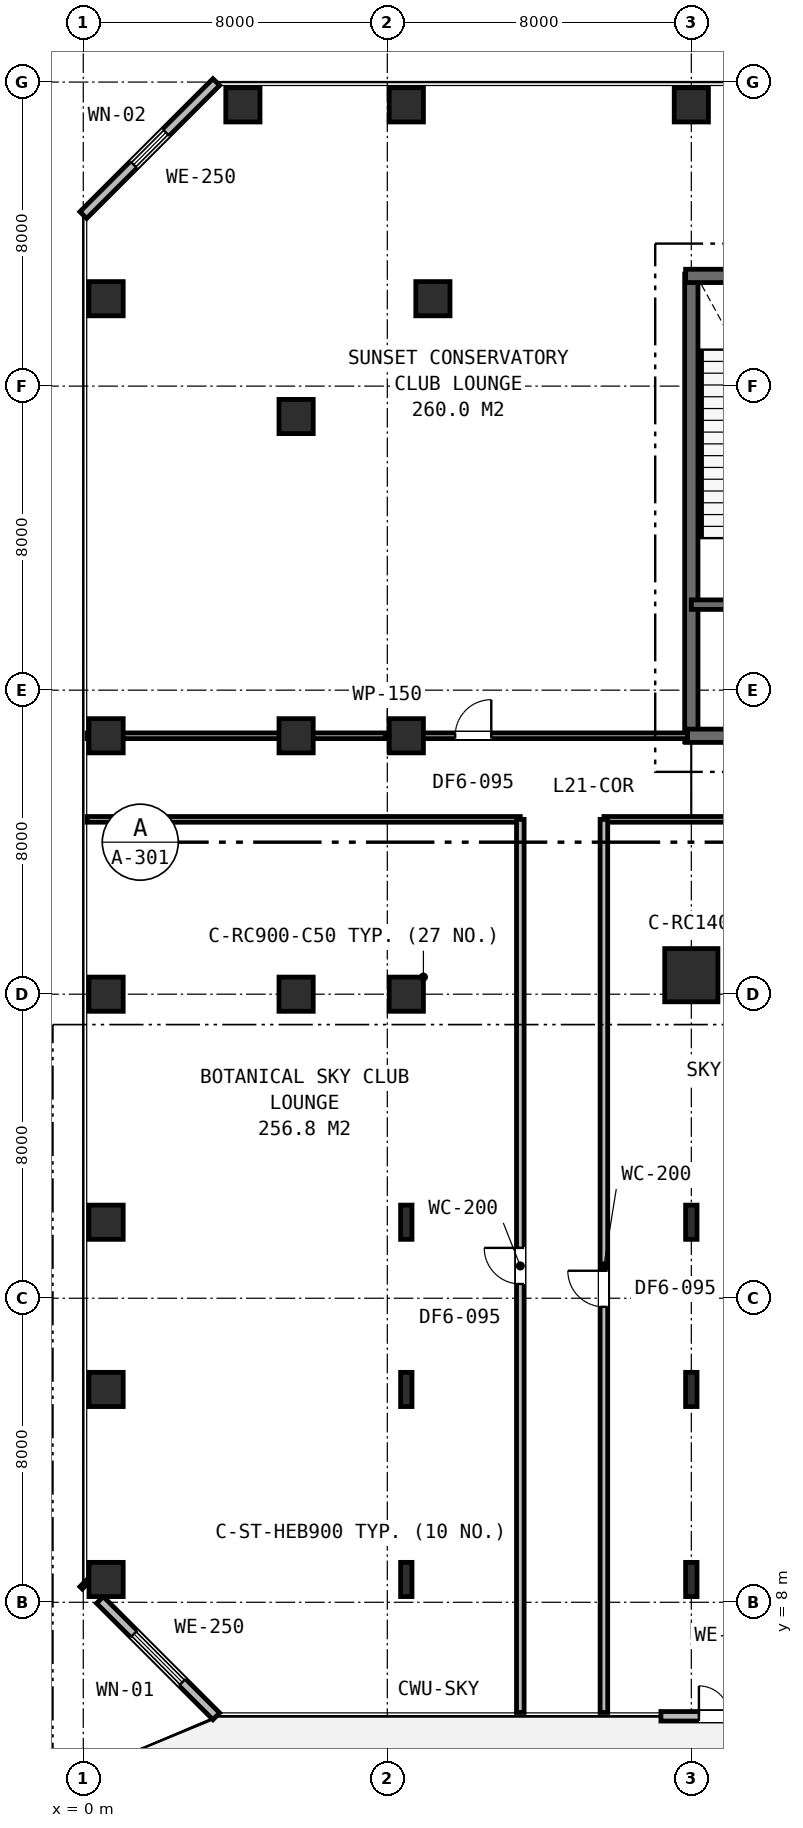
"""IFC4 building model, lengths in metres.
Left out: names, types, materials, properties, quantities, classifications, styles, units other than length and angle.
Written with IfcOpenShell. Run it as: python <this file> out.ifc"""

import sys

from ifc_helpers import new_model, si_unit, direction, frame, frame_2d, origin, origin_2d, place, context, subcontext, project, spatial, rectangle, i_section, extrude, element, fill, save


model = new_model("IFC4")
c1 = context("Model", 3, precision=1e-05, world=origin(), true_north=direction((0.0, 1.0)))
c2 = subcontext(c1, "Body", "Model", "MODEL_VIEW")
j1 = project(units=[si_unit("LENGTHUNIT", "METRE"), si_unit("PLANEANGLEUNIT", "RADIAN")], contexts=[c1])
p1 = place(None, origin())
s1 = spatial("IfcSite", under=j1, at=p1, CompositionType="ELEMENT")
p2 = place(p1, origin())
s2 = spatial("IfcBuilding", under=s1, at=p2, CompositionType="ELEMENT")
p3 = place(p2, frame((0.0, 0.0, 84.6)))
s3 = spatial("IfcBuildingStorey", under=s2, at=p3, CompositionType="ELEMENT", Elevation=84.6)
p4 = place(p3, frame((16.0, 30.65, 0.0), z_axis=(0.0, 0.0, 1.0), x_axis=(0.0, 1.0, 0.0)))
e1 = element("IfcWall", 1, at=p4, inside=s3, PredefinedType="SHEAR", context=c2, shape_type="SweptSolid", body=[
    extrude(rectangle(XDim=12.3, YDim=0.35, at=frame_2d((6.15, 0.0))), origin(), (0.0, 0.0, 1.0), 5.4),
])
p5 = place(p3, frame((15.85, 42.9, 0.0), z_axis=(0.0, 0.0, 1.0), x_axis=(1.0, 0.0, 0.0)))
e2 = element("IfcWall", 2, at=p5, inside=s3, PredefinedType="SHEAR", context=c2, shape_type="SweptSolid", body=[
    extrude(rectangle(XDim=24.3, YDim=0.35, at=frame_2d((12.15, 0.0))), origin(), (0.0, 0.0, 1.0), 5.4),
])
p6 = place(p3, frame((15.85, 30.8, 0.0), z_axis=(0.0, 0.0, 1.0), x_axis=(1.0, 0.0, 0.0)))
e3 = element("IfcWall", 3, at=p6, inside=s3, PredefinedType="SHEAR", context=c2, shape_type="SweptSolid", body=[
    extrude(rectangle(XDim=11.2, YDim=0.35, at=frame_2d((5.6, 0.0))), origin(), (0.0, 0.0, 1.0), 5.4),
])
p7 = place(p6, frame((2.45, 0.0, 0.0)))
e4 = element("IfcOpeningElement", 4, at=p7, cuts=e3, PredefinedType="OPENING", context=c2, shape_type="SweptSolid", body=[
    extrude(rectangle(XDim=1.1, YDim=2.15, at=frame_2d((0.55, 1.075))), frame((0.0, 0.185, 0.0), z_axis=(0.0, -1.0, 0.0), x_axis=(1.0, 0.0, 0.0)), (0.0, 0.0, 1.0), 0.37),
])
p8 = place(p3, frame((16.0, 34.25, 0.0), z_axis=(0.0, 0.0, 1.0), x_axis=(1.0, 0.0, 0.0)))
e5 = element("IfcWall", 5, at=p8, inside=s3, PredefinedType="SHEAR", context=c2, shape_type="SweptSolid", body=[
    extrude(rectangle(XDim=6.05, YDim=0.25, at=frame_2d((3.025, 0.0))), origin(), (0.0, 0.0, 1.0), 5.4),
])
p9 = place(p8, frame((1.25, 0.0, 0.0)))
e6 = element("IfcOpeningElement", 6, at=p9, cuts=e5, PredefinedType="OPENING", context=c2, shape_type="SweptSolid", body=[
    extrude(rectangle(XDim=1.0, YDim=2.15, at=frame_2d((0.5, 1.075))), frame((0.0, 0.135, 0.0), z_axis=(0.0, -1.0, 0.0), x_axis=(1.0, 0.0, 0.0)), (0.0, 0.0, 1.0), 0.27),
])
p10 = place(p8, frame((4.2, 0.0, 0.0)))
e7 = element("IfcOpeningElement", 7, at=p10, cuts=e5, PredefinedType="OPENING", context=c2, shape_type="SweptSolid", body=[
    extrude(rectangle(XDim=1.1, YDim=2.15, at=frame_2d((0.55, 1.075))), frame((0.0, 0.135, 0.0), z_axis=(0.0, -1.0, 0.0), x_axis=(1.0, 0.0, 0.0)), (0.0, 0.0, 1.0), 0.27),
])
p11 = place(p3, frame((8.5, 24.0, 0.0), z_axis=(0.0, 0.0, 1.0), x_axis=(1.0, 0.0, 0.0)))
e8 = element("IfcColumn", 8, at=p11, inside=s3, PredefinedType="COLUMN", context=c2, shape_type="SweptSolid", body=[
    extrude(rectangle(XDim=0.9, YDim=0.9, at=origin_2d()), origin(), (0.0, 0.0, 1.0), 5.4),
])
p12 = place(p3, frame((16.0, 24.5, 0.0), z_axis=(0.0, 0.0, 1.0), x_axis=(1.0, 0.0, 0.0)))
e9 = element("IfcColumn", 9, at=p12, inside=s3, PredefinedType="COLUMN", context=c2, shape_type="SweptSolid", body=[
    extrude(rectangle(XDim=1.4, YDim=1.4, at=origin_2d()), origin(), (0.0, 0.0, 1.0), 5.4),
])
for number, where, z_axis, x_axis in (
    (10, (5.6, 24.0, 0.0), (0.0, 0.0, 1.0), (1.0, 0.0, 0.0)),
    (11, (5.6, 30.8, 0.0), (0.0, 0.0, 1.0), (1.0, 0.0, 0.0)),
    (12, (5.6, 39.2, 0.0), (0.0, 0.0, 1.0), (1.0, 0.0, 0.0)),
    (13, (8.5, 30.8, 0.0), (0.0, 0.0, 1.0), (1.0, 0.0, 0.0)),
    (14, (9.2, 42.3, 0.0), (0.0, 0.0, 1.0), (1.0, 0.0, 0.0)),
    (15, (0.6, 24.0, 0.0), (0.0, 0.0, 1.0), (1.0, 0.0, 0.0)),
    (16, (0.6, 30.8, 0.0), (0.0, 0.0, 1.0), (1.0, 0.0, 0.0)),
    (17, (0.6, 42.3, 0.0), (0.0, 0.0, 1.0), (1.0, 0.0, 0.0)),
    (18, (4.2, 47.4, 0.0), (0.0, 0.0, 1.0), (1.0, 0.0, 0.0)),
    (19, (8.5, 47.4, 0.0), (0.0, 0.0, 1.0), (1.0, 0.0, 0.0)),
    (20, (16.0, 47.4, 0.0), (0.0, 0.0, 1.0), (1.0, 0.0, 0.0)),
    (21, (0.6, 8.6, 0.0), (0.0, 0.0, 1.0), (1.0, 0.0, 0.0)),
    (22, (0.6, 13.6, 0.0), (0.0, 0.0, 1.0), (1.0, 0.0, 0.0)),
    (23, (0.6, 18.0, 0.0), (0.0, 0.0, 1.0), (1.0, 0.0, 0.0)),
):
    element("IfcColumn", number, at=place(p3, frame(where, z_axis=z_axis, x_axis=x_axis)), inside=s3, PredefinedType="COLUMN", context=c2, shape_type="SweptSolid", body=[
        extrude(rectangle(XDim=0.9, YDim=0.9, at=origin_2d()), origin(), (0.0, 0.0, 1.0), 5.4),
    ])
for number, where, z_axis, x_axis in (
    (24, (8.5, 8.6, 0.0), (0.0, 0.0, 1.0), (1.0, 0.0, 0.0)),
    (25, (16.0, 8.6, 0.0), (0.0, 0.0, 1.0), (1.0, 0.0, 0.0)),
    (26, (8.5, 13.6, 0.0), (0.0, 0.0, 1.0), (1.0, 0.0, 0.0)),
    (27, (16.0, 13.6, 0.0), (0.0, 0.0, 1.0), (1.0, 0.0, 0.0)),
    (28, (8.5, 18.0, 0.0), (0.0, 0.0, 1.0), (1.0, 0.0, 0.0)),
    (29, (16.0, 18.0, 0.0), (0.0, 0.0, 1.0), (1.0, 0.0, 0.0)),
):
    element("IfcColumn", number, at=place(p3, frame(where, z_axis=z_axis, x_axis=x_axis)), inside=s3, PredefinedType="COLUMN", context=c2, shape_type="SweptSolid", body=[
        extrude(i_section(OverallWidth=0.3, OverallDepth=0.9, WebThickness=0.018, FlangeThickness=0.035, FilletRadius=0.03, at=origin_2d()), origin(), (0.0, 0.0, 1.0), 5.4),
    ])
p13 = place(p3, frame((15.2, 5.0, 0.0), z_axis=(0.0, 0.0, 1.0), x_axis=(1.0, 0.0, 0.0)))
e30 = element("IfcWall", 30, at=p13, inside=s3, PredefinedType="STANDARD", context=c2, shape_type="SweptSolid", body=[
    extrude(rectangle(XDim=3.6, YDim=0.25, at=frame_2d((1.8, 0.0))), origin(), (0.0, 0.0, 1.0), 5.13),
])
p14 = place(p13, frame((1.0, 0.0, 0.0)))
e31 = element("IfcOpeningElement", 31, at=p14, cuts=e30, PredefinedType="OPENING", context=c2, shape_type="SweptSolid", body=[
    extrude(rectangle(XDim=1.6, YDim=2.2, at=frame_2d((0.8, 1.1))), frame((0.0, 0.135, 0.0), z_axis=(0.0, -1.0, 0.0), x_axis=(1.0, 0.0, 0.0)), (0.0, 0.0, 1.0), 0.27),
])
p15 = place(p3, frame((3.5, 48.0, 0.0), z_axis=(0.0, 0.0, 1.0), x_axis=(-0.707106781187, -0.707106781187, 0.0)))
e32 = element("IfcWall", 32, at=p15, inside=s3, PredefinedType="STANDARD", context=c2, shape_type="SweptSolid", body=[
    extrude(rectangle(XDim=4.95, YDim=0.25, at=frame_2d((2.475, 0.0))), origin(), (0.0, 0.0, 1.0), 5.13),
])
p16 = place(p15, frame((1.875, 0.0, 0.85)))
e33 = element("IfcOpeningElement", 33, at=p16, cuts=e32, PredefinedType="OPENING", context=c2, shape_type="SweptSolid", body=[
    extrude(rectangle(XDim=1.2, YDim=1.6, at=frame_2d((0.6, 0.8))), frame((0.0, 0.135, 0.0), z_axis=(0.0, -1.0, 0.0), x_axis=(1.0, 0.0, 0.0)), (0.0, 0.0, 1.0), 0.27),
])
p17 = place(p3, frame((0.0, 8.5, 0.0), z_axis=(0.0, 0.0, 1.0), x_axis=(0.707106781187, -0.707106781187, 0.0)))
e34 = element("IfcWall", 34, at=p17, inside=s3, PredefinedType="STANDARD", context=c2, shape_type="SweptSolid", body=[
    extrude(rectangle(XDim=0.087, YDim=0.25, at=frame_2d((0.044, 0.0))), origin(), (0.0, 0.0, 1.0), 5.13),
])
p18 = place(p3, frame((0.438, 8.062, 0.0), z_axis=(0.0, 0.0, 1.0), x_axis=(0.707106781187, -0.707106781187, 0.0)))
e35 = element("IfcWall", 35, at=p18, inside=s3, PredefinedType="STANDARD", context=c2, shape_type="SweptSolid", body=[
    extrude(rectangle(XDim=4.33, YDim=0.25, at=frame_2d((2.165, 0.0))), origin(), (0.0, 0.0, 1.0), 5.13),
])
p19 = place(p18, frame((1.265, 0.0, 0.75)))
e36 = element("IfcOpeningElement", 36, at=p19, cuts=e35, PredefinedType="OPENING", context=c2, shape_type="SweptSolid", body=[
    extrude(rectangle(XDim=1.8, YDim=1.85, at=frame_2d((0.9, 0.925))), frame((0.0, 0.135, 0.0), z_axis=(0.0, -1.0, 0.0), x_axis=(1.0, 0.0, 0.0)), (0.0, 0.0, 1.0), 0.27),
])
p20 = place(p3, frame((13.7, 28.6, 0.0), z_axis=(0.0, 0.0, 1.0), x_axis=(1.0, 0.0, 0.0)))
e37 = element("IfcWall", 37, at=p20, inside=s3, PredefinedType="PARTITIONING", context=c2, shape_type="SweptSolid", body=[
    extrude(rectangle(XDim=37.2, YDim=0.15, at=frame_2d((18.6, 0.0))), origin(), (0.0, 0.0, 1.0), 4.63),
])
p21 = place(p20, frame((15.4, 0.0, 0.0)))
e38 = element("IfcOpeningElement", 38, at=p21, cuts=e37, PredefinedType="OPENING", context=c2, shape_type="SweptSolid", body=[
    extrude(rectangle(XDim=1.8, YDim=2.15, at=frame_2d((0.9, 1.075))), frame((0.0, 0.085, 0.0), z_axis=(0.0, -1.0, 0.0), x_axis=(1.0, 0.0, 0.0)), (0.0, 0.0, 1.0), 0.17),
])
p22 = place(p20, frame((27.46, 0.0, 0.0)))
e39 = element("IfcOpeningElement", 39, at=p22, cuts=e37, PredefinedType="OPENING", context=c2, shape_type="SweptSolid", body=[
    extrude(rectangle(XDim=1.8, YDim=2.15, at=frame_2d((0.9, 1.075))), frame((0.0, 0.085, 0.0), z_axis=(0.0, -1.0, 0.0), x_axis=(1.0, 0.0, 0.0)), (0.0, 0.0, 1.0), 0.17),
])
p23 = place(p3, frame((0.1, 30.8, 0.0), z_axis=(0.0, 0.0, 1.0), x_axis=(1.0, 0.0, 0.0)))
e40 = element("IfcWall", 40, at=p23, inside=s3, PredefinedType="PARTITIONING", context=c2, shape_type="SweptSolid", body=[
    extrude(rectangle(XDim=15.8, YDim=0.15, at=frame_2d((7.9, 0.0))), origin(), (0.0, 0.0, 1.0), 4.63),
])
p24 = place(p23, frame((9.686, 0.0, 0.0)))
e41 = element("IfcOpeningElement", 41, at=p24, cuts=e40, PredefinedType="OPENING", context=c2, shape_type="SweptSolid", body=[
    extrude(rectangle(XDim=0.95, YDim=2.15, at=frame_2d((0.475, 1.075))), frame((0.0, 0.085, 0.0), z_axis=(0.0, -1.0, 0.0), x_axis=(1.0, 0.0, 0.0)), (0.0, 0.0, 1.0), 0.17),
])
p25 = place(p3, frame((0.1, 28.6, 0.0), z_axis=(0.0, 0.0, 1.0), x_axis=(1.0, 0.0, 0.0)))
e42 = element("IfcWall", 42, at=p25, inside=s3, PredefinedType="PARTITIONING", context=c2, shape_type="SweptSolid", body=[
    extrude(rectangle(XDim=11.4, YDim=0.15, at=frame_2d((5.7, 0.0))), origin(), (0.0, 0.0, 1.0), 4.63),
])
p26 = place(p3, frame((11.5, 5.1, 0.0), z_axis=(0.0, 0.0, 1.0), x_axis=(0.0, 1.0, 0.0)))
e43 = element("IfcWall", 43, at=p26, inside=s3, PredefinedType="PARTITIONING", context=c2, shape_type="SweptSolid", body=[
    extrude(rectangle(XDim=23.5, YDim=0.2, at=frame_2d((11.75, 0.0))), origin(), (0.0, 0.0, 1.0), 4.63),
])
p27 = place(p26, frame((11.275, 0.0, 0.0)))
e44 = element("IfcOpeningElement", 44, at=p27, cuts=e43, PredefinedType="OPENING", context=c2, shape_type="SweptSolid", body=[
    extrude(rectangle(XDim=0.95, YDim=2.15, at=frame_2d((0.475, 1.075))), frame((0.0, 0.11, 0.0), z_axis=(0.0, -1.0, 0.0), x_axis=(1.0, 0.0, 0.0)), (0.0, 0.0, 1.0), 0.22),
])
p28 = place(p3, frame((13.7, 5.1, 0.0), z_axis=(0.0, 0.0, 1.0), x_axis=(0.0, 1.0, 0.0)))
e45 = element("IfcWall", 45, at=p28, inside=s3, PredefinedType="PARTITIONING", context=c2, shape_type="SweptSolid", body=[
    extrude(rectangle(XDim=23.5, YDim=0.2, at=frame_2d((11.75, 0.0))), origin(), (0.0, 0.0, 1.0), 4.63),
])
p29 = place(p28, frame((10.673, 0.0, 0.0)))
e46 = element("IfcOpeningElement", 46, at=p29, cuts=e45, PredefinedType="OPENING", context=c2, shape_type="SweptSolid", body=[
    extrude(rectangle(XDim=0.95, YDim=2.15, at=frame_2d((0.475, 1.075))), frame((0.0, 0.11, 0.0), z_axis=(0.0, -1.0, 0.0), x_axis=(1.0, 0.0, 0.0)), (0.0, 0.0, 1.0), 0.22),
])
p30 = place(p14, origin())
e47 = element("IfcDoor", 47, at=p30, inside=s3, OperationType="DOUBLE_DOOR_SINGLE_SWING", PredefinedType="DOOR", context=c2, shape_type="SweptSolid", body=[
    extrude(rectangle(XDim=1.6, YDim=2.2, at=frame_2d((0.8, 1.1))), frame((0.0, 0.025, 0.0), z_axis=(0.0, -1.0, 0.0), x_axis=(1.0, 0.0, 0.0)), (0.0, 0.0, 1.0), 0.05),
])
fill(e31, e47)
p31 = place(p16, origin())
e48 = element("IfcWindow", 48, at=p31, inside=s3, PartitioningType="SINGLE_PANEL", PredefinedType="WINDOW", context=c2, shape_type="SweptSolid", body=[
    extrude(rectangle(XDim=1.2, YDim=1.6, at=frame_2d((0.6, 0.8))), frame((0.0, 0.03, 0.0), z_axis=(0.0, -1.0, 0.0), x_axis=(1.0, 0.0, 0.0)), (0.0, 0.0, 1.0), 0.06),
])
fill(e33, e48)
p32 = place(p19, origin())
e49 = element("IfcWindow", 49, at=p32, inside=s3, PartitioningType="SINGLE_PANEL", PredefinedType="WINDOW", context=c2, shape_type="SweptSolid", body=[
    extrude(rectangle(XDim=1.8, YDim=1.85, at=frame_2d((0.9, 0.925))), frame((0.0, 0.03, 0.0), z_axis=(0.0, -1.0, 0.0), x_axis=(1.0, 0.0, 0.0)), (0.0, 0.0, 1.0), 0.06),
])
fill(e36, e49)
p33 = place(p24, origin())
e50 = element("IfcDoor", 50, at=p33, inside=s3, OperationType="SINGLE_SWING_RIGHT", PredefinedType="DOOR", context=c2, shape_type="SweptSolid", body=[
    extrude(rectangle(XDim=0.95, YDim=2.15, at=frame_2d((0.475, 1.075))), frame((0.0, 0.025, 0.0), z_axis=(0.0, -1.0, 0.0), x_axis=(1.0, 0.0, 0.0)), (0.0, 0.0, 1.0), 0.05),
])
fill(e41, e50)
p34 = place(p27, origin())
e51 = element("IfcDoor", 51, at=p34, inside=s3, OperationType="SINGLE_SWING_RIGHT", PredefinedType="DOOR", context=c2, shape_type="SweptSolid", body=[
    extrude(rectangle(XDim=0.95, YDim=2.15, at=frame_2d((0.475, 1.075))), frame((0.0, 0.025, 0.0), z_axis=(0.0, -1.0, 0.0), x_axis=(1.0, 0.0, 0.0)), (0.0, 0.0, 1.0), 0.05),
])
fill(e44, e51)
p35 = place(p29, origin())
e52 = element("IfcDoor", 52, at=p35, inside=s3, OperationType="SINGLE_SWING_RIGHT", PredefinedType="DOOR", context=c2, shape_type="SweptSolid", body=[
    extrude(rectangle(XDim=0.95, YDim=2.15, at=frame_2d((0.475, 1.075))), frame((0.0, 0.025, 0.0), z_axis=(0.0, -1.0, 0.0), x_axis=(1.0, 0.0, 0.0)), (0.0, 0.0, 1.0), 0.05),
])
fill(e46, e52)
save(model, sys.argv[1])
